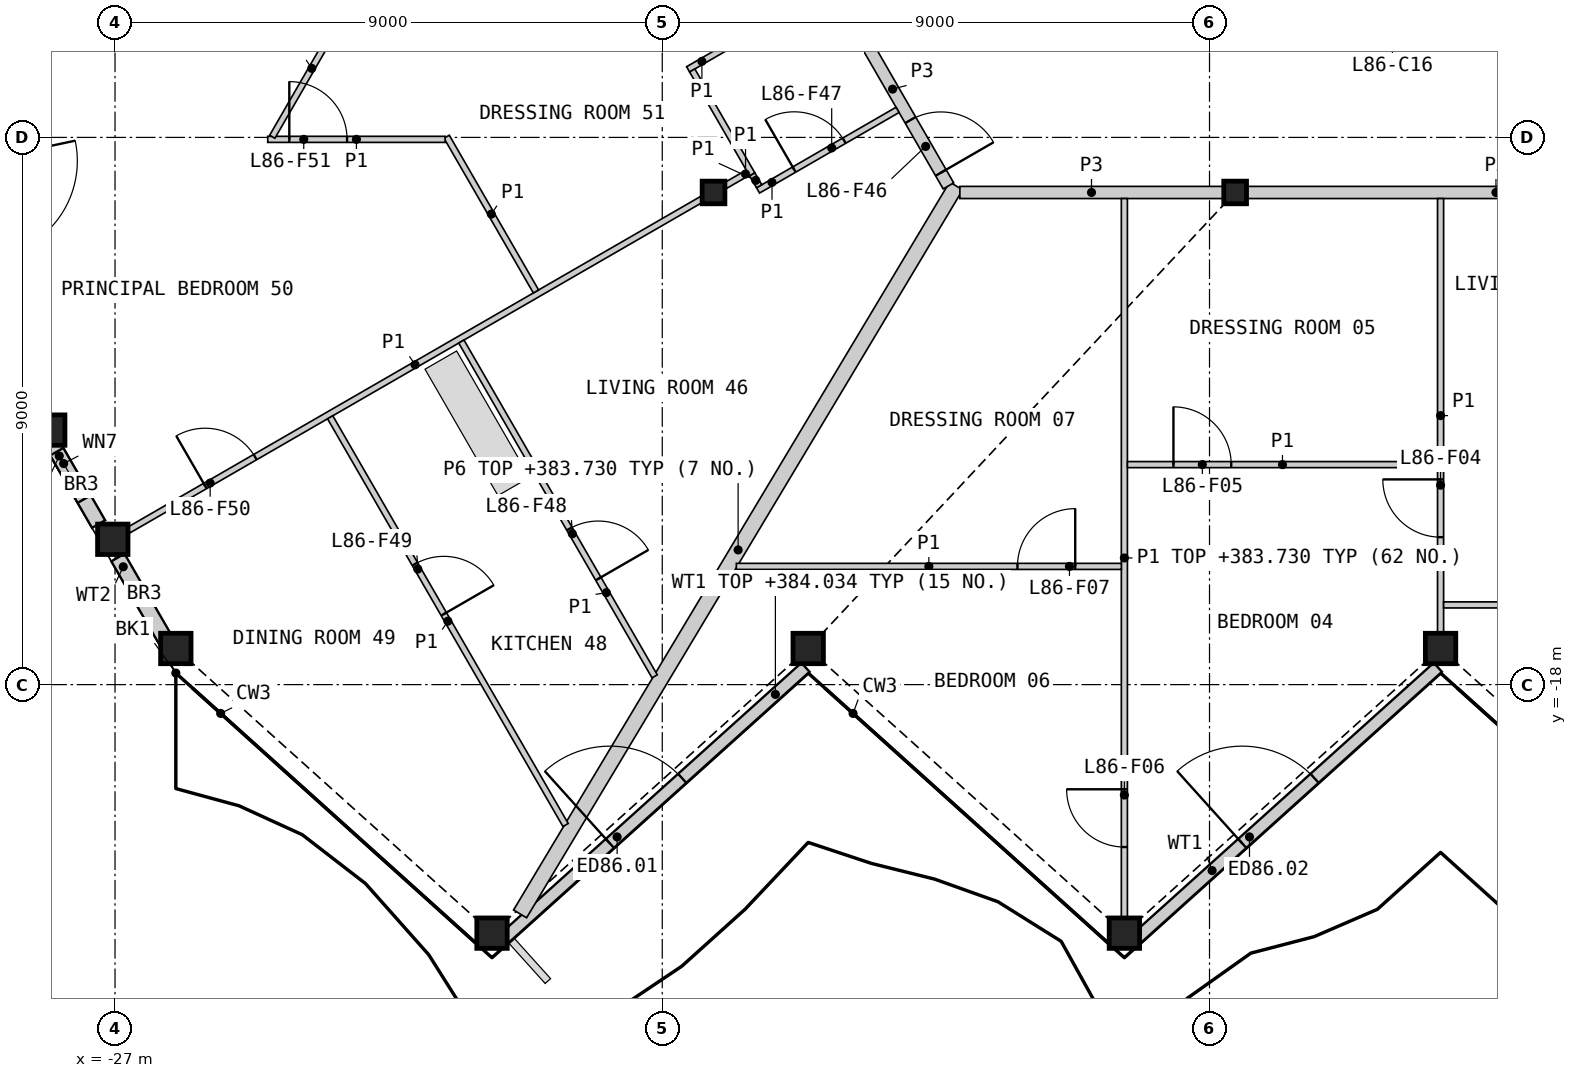
"""IFC4 building model, lengths in metres.
Left out: names, types, materials, properties, quantities, classifications, styles, units other than length and angle.
Written with IfcOpenShell. Run it as: python <this file> out.ifc"""

import sys

from ifc_helpers import new_model, si_unit, direction, frame, frame_2d, origin, origin_2d, place, context, subcontext, project, spatial, rectangle, hollow_rectangle, i_section, extrude, element, fill, save


model = new_model("IFC4")
c1 = context("Model", 3, precision=1e-05, world=origin(), true_north=direction((0.0, 1.0)))
c2 = subcontext(c1, "Body", "Model", "MODEL_VIEW")
j1 = project(units=[si_unit("LENGTHUNIT", "METRE"), si_unit("PLANEANGLEUNIT", "RADIAN")], contexts=[c1])
p1 = place(None, origin())
s1 = spatial("IfcSite", under=j1, at=p1, CompositionType="ELEMENT")
p2 = place(p1, origin())
s2 = spatial("IfcBuilding", under=s1, at=p2, CompositionType="ELEMENT")
p3 = place(p2, frame((0.0, 0.0, 381.4)))
s3 = spatial("IfcBuildingStorey", under=s2, at=p3, CompositionType="ELEMENT", Elevation=381.4)
for number, where, z_axis, x_axis in (
    (1, (-26.0, -17.406, 0.0), (0.0, 0.0, 1.0), (1.0, 0.0, 0.0)),
    (2, (-20.8, -22.088, 0.0), (0.0, 0.0, 1.0), (1.0, 0.0, 0.0)),
    (3, (-15.6, -17.406, 0.0), (0.0, 0.0, 1.0), (1.0, 0.0, 0.0)),
    (4, (-10.4, -22.088, 0.0), (0.0, 0.0, 1.0), (1.0, 0.0, 0.0)),
    (5, (-5.2, -17.406, 0.0), (0.0, 0.0, 1.0), (1.0, 0.0, 0.0)),
    (6, (-28.074, -13.814, 0.0), (0.0, 0.0, 1.0), (1.0, 0.0, 0.0)),
    (7, (-27.037, -15.61, 0.0), (0.0, 0.0, 1.0), (1.0, 0.0, 0.0)),
):
    element("IfcColumn", number, at=place(p3, frame(where, z_axis=z_axis, x_axis=x_axis)), inside=s3, PredefinedType="COLUMN", context=c2, shape_type="SweptSolid", body=[
        extrude(hollow_rectangle(XDim=0.5, YDim=0.5, WallThickness=0.03, at=origin_2d()), origin(), (0.0, 0.0, 1.0), 3.4),
    ])
for number, where, z_axis, x_axis in (
    (8, (-17.157, -9.906, 0.0), (0.0, 0.0, 1.0), (1.0, 0.0, 0.0)),
    (9, (-8.578, -9.906, 0.0), (0.0, 0.0, 1.0), (1.0, 0.0, 0.0)),
):
    element("IfcColumn", number, at=place(p3, frame(where, z_axis=z_axis, x_axis=x_axis)), inside=s3, PredefinedType="COLUMN", context=c2, shape_type="SweptSolid", body=[
        extrude(i_section(OverallWidth=0.374, OverallDepth=0.372, WebThickness=0.016, FlangeThickness=0.026, at=origin_2d()), origin(), (0.0, 0.0, 1.0), 3.4),
    ])
p4 = place(p3, frame((-20.595, -22.173, 0.0), z_axis=(0.0, 0.0, 1.0), x_axis=(0.743135582201, 0.669140871915, 0.0)))
e10 = element("IfcWall", 10, at=p4, inside=s3, PredefinedType="SOLIDWALL", context=c2, shape_type="SweptSolid", body=[
    extrude(rectangle(XDim=6.662, YDim=0.2, at=frame_2d((3.331, 0.0))), origin(), (0.0, 0.0, 1.0), 2.634),
])
p5 = place(p4, frame((2.333, 0.0, 0.0)))
e11 = element("IfcOpeningElement", 11, at=p5, cuts=e10, PredefinedType="OPENING", context=c2, shape_type="SweptSolid", body=[
    extrude(rectangle(XDim=1.6, YDim=2.25, at=frame_2d((0.8, 1.125))), frame((0.0, 0.11, 0.0), z_axis=(0.0, -1.0, 0.0), x_axis=(1.0, 0.0, 0.0)), (0.0, 0.0, 1.0), 0.22),
])
p6 = place(p3, frame((-10.195, -22.173, 0.0), z_axis=(0.0, 0.0, 1.0), x_axis=(0.743119171875, 0.669159096473, 0.0)))
e12 = element("IfcWall", 12, at=p6, inside=s3, PredefinedType="SOLIDWALL", context=c2, shape_type="SweptSolid", body=[
    extrude(rectangle(XDim=6.661, YDim=0.2, at=frame_2d((3.331, 0.0))), origin(), (0.0, 0.0, 1.0), 2.634),
])
p7 = place(p6, frame((2.333, 0.0, 0.0)))
e13 = element("IfcOpeningElement", 13, at=p7, cuts=e12, PredefinedType="OPENING", context=c2, shape_type="SweptSolid", body=[
    extrude(rectangle(XDim=1.6, YDim=2.25, at=frame_2d((0.8, 1.125))), frame((0.0, 0.11, 0.0), z_axis=(0.0, -1.0, 0.0), x_axis=(1.0, 0.0, 0.0)), (0.0, 0.0, 1.0), 0.22),
])
p8 = place(p3, frame((-28.132, -13.866, 0.0), z_axis=(0.0, 0.0, 1.0), x_axis=(0.499975693202, -0.866039436866, 0.0)))
e14 = element("IfcWall", 14, at=p8, inside=s3, PredefinedType="SOLIDWALL", context=c2, shape_type="SweptSolid", body=[
    extrude(rectangle(XDim=1.725, YDim=0.25, at=frame_2d((0.862, 0.0))), origin(), (0.0, 0.0, 1.0), 2.634),
])
p9 = place(p8, frame((0.35, 0.0, 1.8)))
e15 = element("IfcOpeningElement", 15, at=p9, cuts=e14, PredefinedType="OPENING", context=c2, shape_type="SweptSolid", body=[
    extrude(rectangle(XDim=0.9, YDim=0.6, at=frame_2d((0.45, 0.3))), frame((0.0, 0.135, 0.0), z_axis=(0.0, -1.0, 0.0), x_axis=(1.0, 0.0, 0.0)), (0.0, 0.0, 1.0), 0.27),
])
p10 = place(p3, frame((-26.953, -15.91, 0.0), z_axis=(0.0, 0.0, 1.0), x_axis=(0.500027377864, -0.86600959659, 0.0)))
e16 = element("IfcWall", 16, at=p10, inside=s3, PredefinedType="SOLIDWALL", context=c2, shape_type="SweptSolid", body=[
    extrude(rectangle(XDim=1.756, YDim=0.25, at=frame_2d((0.878, 0.0))), origin(), (0.0, 0.0, 1.0), 2.634),
])
p11 = place(p3, frame((-20.338, -21.771, 0.0), z_axis=(0.0, 0.0, 1.0), x_axis=(0.513878217441, 0.857863146218, 0.0)))
e17 = element("IfcWall", 17, at=p11, inside=s3, PredefinedType="PARTITIONING", context=c2, shape_type="SweptSolid", body=[
    extrude(rectangle(XDim=13.956, YDim=0.25, at=frame_2d((6.978, 0.0))), origin(), (0.0, 0.0, 1.0), 2.33),
])
p12 = place(p3, frame((-8.382, -9.906, 0.0), z_axis=(0.0, 0.0, 1.0), x_axis=(1.0, 0.0, 0.0)))
e18 = element("IfcWall", 18, at=p12, inside=s3, PredefinedType="PARTITIONING", context=c2, shape_type="SweptSolid", body=[
    extrude(rectangle(XDim=8.185, YDim=0.2, at=frame_2d((4.092, 0.0))), origin(), (0.0, 0.0, 1.0), 3.1),
])
p13 = place(p12, frame((5.213, 0.0, 0.0)))
e19 = element("IfcOpeningElement", 19, at=p13, cuts=e18, PredefinedType="OPENING", context=c2, shape_type="SweptSolid", body=[
    extrude(rectangle(XDim=1.0, YDim=2.1, at=frame_2d((0.5, 1.05))), frame((0.0, 0.11, 0.0), z_axis=(0.0, -1.0, 0.0), x_axis=(1.0, 0.0, 0.0)), (0.0, 0.0, 1.0), 0.22),
])
p14 = place(p3, frame((-13.106, -9.906, 0.0), z_axis=(0.0, 0.0, 1.0), x_axis=(1.0, 0.0, 0.0)))
e20 = element("IfcWall", 20, at=p14, inside=s3, PredefinedType="PARTITIONING", context=c2, shape_type="SweptSolid", body=[
    extrude(rectangle(XDim=4.331, YDim=0.2, at=frame_2d((2.165, 0.0))), origin(), (0.0, 0.0, 1.0), 3.1),
])
p15 = place(p3, frame((-15.131, -6.614, 0.0), z_axis=(0.0, 0.0, 1.0), x_axis=(0.499967746641, -0.866044024469, 0.0)))
e21 = element("IfcWall", 21, at=p15, inside=s3, PredefinedType="PARTITIONING", context=c2, shape_type="SweptSolid", body=[
    extrude(rectangle(XDim=3.676, YDim=0.2, at=frame_2d((1.838, 0.0))), origin(), (0.0, 0.0, 1.0), 3.1),
])
p16 = place(p15, frame((2.426, 0.0, 0.0)))
e22 = element("IfcOpeningElement", 22, at=p16, cuts=e21, PredefinedType="OPENING", context=c2, shape_type="SweptSolid", body=[
    extrude(rectangle(XDim=1.0, YDim=2.1, at=frame_2d((0.5, 1.05))), frame((0.0, 0.11, 0.0), z_axis=(0.0, -1.0, 0.0), x_axis=(1.0, 0.0, 0.0)), (0.0, 0.0, 1.0), 0.22),
])
p17 = place(p3, frame((-10.4, -21.828, 0.0), z_axis=(0.0, 0.0, 1.0), x_axis=(0.0, 1.0, 0.0)))
e23 = element("IfcWall", 23, at=p17, inside=s3, PredefinedType="PARTITIONING", context=c2, shape_type="SweptSolid", body=[
    extrude(rectangle(XDim=11.822, YDim=0.1, at=frame_2d((5.911, 0.0))), origin(), (0.0, 0.0, 1.0), 2.33),
])
p18 = place(p17, frame((1.156, 0.0, 0.0)))
e24 = element("IfcOpeningElement", 24, at=p18, cuts=e23, PredefinedType="OPENING", context=c2, shape_type="SweptSolid", body=[
    extrude(rectangle(XDim=0.95, YDim=2.1, at=frame_2d((0.475, 1.05))), frame((0.0, 0.06, 0.0), z_axis=(0.0, -1.0, 0.0), x_axis=(1.0, 0.0, 0.0)), (0.0, 0.0, 1.0), 0.12),
])
p19 = place(p3, frame((-26.777, -15.46, 0.0), z_axis=(0.0, 0.0, 1.0), x_axis=(0.866019680922, 0.500009912158, 0.0)))
e25 = element("IfcWall", 25, at=p19, inside=s3, PredefinedType="PARTITIONING", context=c2, shape_type="SweptSolid", body=[
    extrude(rectangle(XDim=10.881, YDim=0.1, at=frame_2d((5.44, 0.0))), origin(), (0.0, 0.0, 1.0), 2.33),
])
p20 = place(p19, frame((1.454, 0.0, 0.0)))
e26 = element("IfcOpeningElement", 26, at=p20, cuts=e25, PredefinedType="OPENING", context=c2, shape_type="SweptSolid", body=[
    extrude(rectangle(XDim=0.95, YDim=2.1, at=frame_2d((0.475, 1.05))), frame((0.0, 0.06, 0.0), z_axis=(0.0, -1.0, 0.0), x_axis=(1.0, 0.0, 0.0)), (0.0, 0.0, 1.0), 0.12),
])
p21 = place(p3, frame((-23.462, -13.603, 0.0), z_axis=(0.0, 0.0, 1.0), x_axis=(0.499998111909, -0.866026493871, 0.0)))
e27 = element("IfcWall", 27, at=p21, inside=s3, PredefinedType="PARTITIONING", context=c2, shape_type="SweptSolid", body=[
    extrude(rectangle(XDim=7.743, YDim=0.1, at=frame_2d((3.872, 0.0))), origin(), (0.0, 0.0, 1.0), 2.33),
])
p22 = place(p21, frame((2.788, 0.0, 0.0)))
e28 = element("IfcOpeningElement", 28, at=p22, cuts=e27, PredefinedType="OPENING", context=c2, shape_type="SweptSolid", body=[
    extrude(rectangle(XDim=0.95, YDim=2.1, at=frame_2d((0.475, 1.05))), frame((0.0, 0.06, 0.0), z_axis=(0.0, -1.0, 0.0), x_axis=(1.0, 0.0, 0.0)), (0.0, 0.0, 1.0), 0.12),
])
p23 = place(p3, frame((-5.2, -17.146, 0.0), z_axis=(0.0, 0.0, 1.0), x_axis=(0.0, 1.0, 0.0)))
e29 = element("IfcWall", 29, at=p23, inside=s3, PredefinedType="PARTITIONING", context=c2, shape_type="SweptSolid", body=[
    extrude(rectangle(XDim=7.14, YDim=0.1, at=frame_2d((3.57, 0.0))), origin(), (0.0, 0.0, 1.0), 2.33),
])
p24 = place(p23, frame((1.571, 0.0, 0.0)))
e30 = element("IfcOpeningElement", 30, at=p24, cuts=e29, PredefinedType="OPENING", context=c2, shape_type="SweptSolid", body=[
    extrude(rectangle(XDim=0.95, YDim=2.1, at=frame_2d((0.475, 1.05))), frame((0.0, 0.06, 0.0), z_axis=(0.0, -1.0, 0.0), x_axis=(1.0, 0.0, 0.0)), (0.0, 0.0, 1.0), 0.12),
])
p25 = place(p3, frame((-21.304, -12.358, 0.0), z_axis=(0.0, 0.0, 1.0), x_axis=(0.500000558108, -0.866025081561, 0.0)))
e31 = element("IfcWall", 31, at=p25, inside=s3, PredefinedType="PARTITIONING", context=c2, shape_type="SweptSolid", body=[
    extrude(rectangle(XDim=6.358, YDim=0.1, at=frame_2d((3.179, 0.0))), origin(), (0.0, 0.0, 1.0), 2.33),
])
p26 = place(p25, frame((3.555, 0.0, 0.0)))
e32 = element("IfcOpeningElement", 32, at=p26, cuts=e31, PredefinedType="OPENING", context=c2, shape_type="SweptSolid", body=[
    extrude(rectangle(XDim=0.95, YDim=2.1, at=frame_2d((0.475, 1.05))), frame((0.0, 0.06, 0.0), z_axis=(0.0, -1.0, 0.0), x_axis=(1.0, 0.0, 0.0)), (0.0, 0.0, 1.0), 0.12),
])
p27 = place(p3, frame((-16.781, -16.055, 0.0), z_axis=(0.0, 0.0, 1.0), x_axis=(1.0, 0.0, 0.0)))
e33 = element("IfcWall", 33, at=p27, inside=s3, PredefinedType="PARTITIONING", context=c2, shape_type="SweptSolid", body=[
    extrude(rectangle(XDim=6.332, YDim=0.1, at=frame_2d((3.166, 0.0))), origin(), (0.0, 0.0, 1.0), 2.33),
])
p28 = place(p27, frame((4.623, 0.0, 0.0)))
e34 = element("IfcOpeningElement", 34, at=p28, cuts=e33, PredefinedType="OPENING", context=c2, shape_type="SweptSolid", body=[
    extrude(rectangle(XDim=0.95, YDim=2.1, at=frame_2d((0.475, 1.05))), frame((0.0, 0.06, 0.0), z_axis=(0.0, -1.0, 0.0), x_axis=(1.0, 0.0, 0.0)), (0.0, 0.0, 1.0), 0.12),
])
p29 = place(p3, frame((-5.15, -16.689, 0.0), z_axis=(0.0, 0.0, 1.0), x_axis=(1.0, 0.0, 0.0)))
e35 = element("IfcWall", 35, at=p29, inside=s3, PredefinedType="PARTITIONING", context=c2, shape_type="SweptSolid", body=[
    extrude(rectangle(XDim=5.05, YDim=0.1, at=frame_2d((2.525, 0.0))), origin(), (0.0, 0.0, 1.0), 2.33),
])
p30 = place(p29, frame((1.25, 0.0, 0.0)))
e36 = element("IfcOpeningElement", 36, at=p30, cuts=e35, PredefinedType="OPENING", context=c2, shape_type="SweptSolid", body=[
    extrude(rectangle(XDim=0.95, YDim=2.1, at=frame_2d((0.475, 1.05))), frame((0.0, 0.06, 0.0), z_axis=(0.0, -1.0, 0.0), x_axis=(1.0, 0.0, 0.0)), (0.0, 0.0, 1.0), 0.12),
])
p31 = place(p3, frame((-10.35, -14.382, 0.0), z_axis=(0.0, 0.0, 1.0), x_axis=(1.0, 0.0, 0.0)))
e37 = element("IfcWall", 37, at=p31, inside=s3, PredefinedType="PARTITIONING", context=c2, shape_type="SweptSolid", body=[
    extrude(rectangle(XDim=5.1, YDim=0.1, at=frame_2d((2.55, 0.0))), origin(), (0.0, 0.0, 1.0), 2.33),
])
p32 = place(p31, frame((0.757, 0.0, 0.0)))
e38 = element("IfcOpeningElement", 38, at=p32, cuts=e37, PredefinedType="OPENING", context=c2, shape_type="SweptSolid", body=[
    extrude(rectangle(XDim=0.95, YDim=2.1, at=frame_2d((0.475, 1.05))), frame((0.0, 0.06, 0.0), z_axis=(0.0, -1.0, 0.0), x_axis=(1.0, 0.0, 0.0)), (0.0, 0.0, 1.0), 0.12),
])
p33 = place(p3, frame((-21.546, -8.989, 0.0), z_axis=(0.0, 0.0, 1.0), x_axis=(0.499919039967, -0.866072141036, 0.0)))
e39 = element("IfcWall", 39, at=p33, inside=s3, PredefinedType="PARTITIONING", context=c2, shape_type="SweptSolid", body=[
    extrude(rectangle(XDim=2.938, YDim=0.1, at=frame_2d((1.469, 0.0))), origin(), (0.0, 0.0, 1.0), 2.33),
])
p34 = place(p3, frame((-24.489, -9.032, 0.0), z_axis=(0.0, 0.0, 1.0), x_axis=(1.0, 0.0, 0.0)))
e40 = element("IfcWall", 40, at=p34, inside=s3, PredefinedType="PARTITIONING", context=c2, shape_type="SweptSolid", body=[
    extrude(rectangle(XDim=2.917, YDim=0.1, at=frame_2d((1.459, 0.0))), origin(), (0.0, 0.0, 1.0), 2.33),
])
p35 = place(p34, frame((0.355, 0.0, 0.0)))
e41 = element("IfcOpeningElement", 41, at=p35, cuts=e40, PredefinedType="OPENING", context=c2, shape_type="SweptSolid", body=[
    extrude(rectangle(XDim=0.95, YDim=2.1, at=frame_2d((0.475, 1.05))), frame((0.0, 0.06, 0.0), z_axis=(0.0, -1.0, 0.0), x_axis=(1.0, 0.0, 0.0)), (0.0, 0.0, 1.0), 0.12),
])
p36 = place(p3, frame((-24.414, -8.989, 0.0), z_axis=(0.0, 0.0, 1.0), x_axis=(0.500042595688, 0.866000809756, 0.0)))
e42 = element("IfcWall", 42, at=p36, inside=s3, PredefinedType="PARTITIONING", context=c2, shape_type="SweptSolid", body=[
    extrude(rectangle(XDim=2.596, YDim=0.1, at=frame_2d((1.298, 0.0))), origin(), (0.0, 0.0, 1.0), 2.33),
])
p37 = place(p3, frame((-17.575, -7.881, 0.0), z_axis=(0.0, 0.0, 1.0), x_axis=(0.866036909293, 0.499980071345, 0.0)))
e43 = element("IfcWall", 43, at=p37, inside=s3, PredefinedType="PARTITIONING", context=c2, shape_type="SweptSolid", body=[
    extrude(rectangle(XDim=2.625, YDim=0.1, at=frame_2d((1.312, 0.0))), origin(), (0.0, 0.0, 1.0), 2.33),
])
p38 = place(p3, frame((-16.425, -9.872, 0.0), z_axis=(0.0, 0.0, 1.0), x_axis=(0.86603978909, 0.499975083092, 0.0)))
e44 = element("IfcWall", 44, at=p38, inside=s3, PredefinedType="PARTITIONING", context=c2, shape_type="SweptSolid", body=[
    extrude(rectangle(XDim=2.649, YDim=0.1, at=frame_2d((1.325, 0.0))), origin(), (0.0, 0.0, 1.0), 2.33),
])
p39 = place(p38, frame((0.686, 0.0, 0.0)))
e45 = element("IfcOpeningElement", 45, at=p39, cuts=e44, PredefinedType="OPENING", context=c2, shape_type="SweptSolid", body=[
    extrude(rectangle(XDim=0.95, YDim=2.1, at=frame_2d((0.475, 1.05))), frame((0.0, 0.06, 0.0), z_axis=(0.0, -1.0, 0.0), x_axis=(1.0, 0.0, 0.0)), (0.0, 0.0, 1.0), 0.12),
])
p40 = place(p3, frame((-17.507, -7.899, 0.0), z_axis=(0.0, 0.0, 1.0), x_axis=(0.500011643316, -0.866018681408, 0.0)))
e46 = element("IfcWall", 46, at=p40, inside=s3, PredefinedType="PARTITIONING", context=c2, shape_type="SweptSolid", body=[
    extrude(rectangle(XDim=1.973, YDim=0.1, at=frame_2d((0.987, 0.0))), origin(), (0.0, 0.0, 1.0), 2.33),
])
p41 = place(p3, frame((-16.96, -9.792, 0.0), z_axis=(0.0, 0.0, 1.0), x_axis=(0.866137484628, 0.499805820016, 0.0)))
e47 = element("IfcWall", 47, at=p41, inside=s3, PredefinedType="PARTITIONING", context=c2, shape_type="SweptSolid", body=[
    extrude(rectangle(XDim=0.423, YDim=0.1, at=frame_2d((0.211, 0.0))), origin(), (0.0, 0.0, 1.0), 2.33),
])
p42 = place(p3, frame((-16.519, -9.61, 0.0), z_axis=(0.0, 0.0, 1.0), x_axis=(0.50245032488, -0.864606078528, 0.0)))
e48 = element("IfcWall", 48, at=p42, inside=s3, PredefinedType="PARTITIONING", context=c2, shape_type="SweptSolid", body=[
    extrude(rectangle(XDim=0.224, YDim=0.1, at=frame_2d((0.112, 0.0))), origin(), (0.0, 0.0, 1.0), 2.33),
])
p43 = place(p5, origin())
e49 = element("IfcDoor", 49, at=p43, inside=s3, OperationType="DOUBLE_DOOR_SINGLE_SWING", PredefinedType="DOOR", context=c2, shape_type="SweptSolid", body=[
    extrude(rectangle(XDim=1.6, YDim=2.25, at=frame_2d((0.8, 1.125))), frame((0.0, 0.025, 0.0), z_axis=(0.0, -1.0, 0.0), x_axis=(1.0, 0.0, 0.0)), (0.0, 0.0, 1.0), 0.05),
])
fill(e11, e49)
p44 = place(p7, origin())
e50 = element("IfcDoor", 50, at=p44, inside=s3, OperationType="DOUBLE_DOOR_SINGLE_SWING", PredefinedType="DOOR", context=c2, shape_type="SweptSolid", body=[
    extrude(rectangle(XDim=1.6, YDim=2.25, at=frame_2d((0.8, 1.125))), frame((0.0, 0.025, 0.0), z_axis=(0.0, -1.0, 0.0), x_axis=(1.0, 0.0, 0.0)), (0.0, 0.0, 1.0), 0.05),
])
fill(e13, e50)
p45 = place(p9, origin())
e51 = element("IfcWindow", 51, at=p45, inside=s3, PartitioningType="SINGLE_PANEL", PredefinedType="WINDOW", context=c2, shape_type="SweptSolid", body=[
    extrude(rectangle(XDim=0.9, YDim=0.6, at=frame_2d((0.45, 0.3))), frame((0.0, 0.03, 0.0), z_axis=(0.0, -1.0, 0.0), x_axis=(1.0, 0.0, 0.0)), (0.0, 0.0, 1.0), 0.06),
])
fill(e15, e51)
p46 = place(p24, origin())
e52 = element("IfcDoor", 52, at=p46, inside=s3, OperationType="SINGLE_SWING_RIGHT", PredefinedType="DOOR", context=c2, shape_type="SweptSolid", body=[
    extrude(rectangle(XDim=0.95, YDim=2.1, at=frame_2d((0.475, 1.05))), frame((0.0, 0.025, 0.0), z_axis=(0.0, -1.0, 0.0), x_axis=(1.0, 0.0, 0.0)), (0.0, 0.0, 1.0), 0.05),
])
fill(e30, e52)
p47 = place(p32, origin())
e53 = element("IfcDoor", 53, at=p47, inside=s3, OperationType="SINGLE_SWING_LEFT", PredefinedType="DOOR", context=c2, shape_type="SweptSolid", body=[
    extrude(rectangle(XDim=0.95, YDim=2.1, at=frame_2d((0.475, 1.05))), frame((0.0, 0.025, 0.0), z_axis=(0.0, -1.0, 0.0), x_axis=(1.0, 0.0, 0.0)), (0.0, 0.0, 1.0), 0.05),
])
fill(e38, e53)
p48 = place(p18, origin())
e54 = element("IfcDoor", 54, at=p48, inside=s3, OperationType="SINGLE_SWING_RIGHT", PredefinedType="DOOR", context=c2, shape_type="SweptSolid", body=[
    extrude(rectangle(XDim=0.95, YDim=2.1, at=frame_2d((0.475, 1.05))), frame((0.0, 0.025, 0.0), z_axis=(0.0, -1.0, 0.0), x_axis=(1.0, 0.0, 0.0)), (0.0, 0.0, 1.0), 0.05),
])
fill(e24, e54)
p49 = place(p28, origin())
e55 = element("IfcDoor", 55, at=p49, inside=s3, OperationType="SINGLE_SWING_RIGHT", PredefinedType="DOOR", context=c2, shape_type="SweptSolid", body=[
    extrude(rectangle(XDim=0.95, YDim=2.1, at=frame_2d((0.475, 1.05))), frame((0.0, 0.025, 0.0), z_axis=(0.0, -1.0, 0.0), x_axis=(1.0, 0.0, 0.0)), (0.0, 0.0, 1.0), 0.05),
])
fill(e34, e55)
p50 = place(p16, origin())
e56 = element("IfcDoor", 56, at=p50, inside=s3, OperationType="SINGLE_SWING_RIGHT", PredefinedType="DOOR", context=c2, shape_type="SweptSolid", body=[
    extrude(rectangle(XDim=1.0, YDim=2.1, at=frame_2d((0.5, 1.05))), frame((0.0, 0.025, 0.0), z_axis=(0.0, -1.0, 0.0), x_axis=(1.0, 0.0, 0.0)), (0.0, 0.0, 1.0), 0.05),
])
fill(e22, e56)
p51 = place(p39, origin())
e57 = element("IfcDoor", 57, at=p51, inside=s3, OperationType="SINGLE_SWING_LEFT", PredefinedType="DOOR", context=c2, shape_type="SweptSolid", body=[
    extrude(rectangle(XDim=0.95, YDim=2.1, at=frame_2d((0.475, 1.05))), frame((0.0, 0.025, 0.0), z_axis=(0.0, -1.0, 0.0), x_axis=(1.0, 0.0, 0.0)), (0.0, 0.0, 1.0), 0.05),
])
fill(e45, e57)
p52 = place(p26, origin())
e58 = element("IfcDoor", 58, at=p52, inside=s3, OperationType="SINGLE_SWING_RIGHT", PredefinedType="DOOR", context=c2, shape_type="SweptSolid", body=[
    extrude(rectangle(XDim=0.95, YDim=2.1, at=frame_2d((0.475, 1.05))), frame((0.0, 0.025, 0.0), z_axis=(0.0, -1.0, 0.0), x_axis=(1.0, 0.0, 0.0)), (0.0, 0.0, 1.0), 0.05),
])
fill(e32, e58)
p53 = place(p22, origin())
e59 = element("IfcDoor", 59, at=p53, inside=s3, OperationType="SINGLE_SWING_RIGHT", PredefinedType="DOOR", context=c2, shape_type="SweptSolid", body=[
    extrude(rectangle(XDim=0.95, YDim=2.1, at=frame_2d((0.475, 1.05))), frame((0.0, 0.025, 0.0), z_axis=(0.0, -1.0, 0.0), x_axis=(1.0, 0.0, 0.0)), (0.0, 0.0, 1.0), 0.05),
])
fill(e28, e59)
p54 = place(p20, origin())
e60 = element("IfcDoor", 60, at=p54, inside=s3, OperationType="SINGLE_SWING_LEFT", PredefinedType="DOOR", context=c2, shape_type="SweptSolid", body=[
    extrude(rectangle(XDim=0.95, YDim=2.1, at=frame_2d((0.475, 1.05))), frame((0.0, 0.025, 0.0), z_axis=(0.0, -1.0, 0.0), x_axis=(1.0, 0.0, 0.0)), (0.0, 0.0, 1.0), 0.05),
])
fill(e26, e60)
p55 = place(p35, origin())
e61 = element("IfcDoor", 61, at=p55, inside=s3, OperationType="SINGLE_SWING_LEFT", PredefinedType="DOOR", context=c2, shape_type="SweptSolid", body=[
    extrude(rectangle(XDim=0.95, YDim=2.1, at=frame_2d((0.475, 1.05))), frame((0.0, 0.025, 0.0), z_axis=(0.0, -1.0, 0.0), x_axis=(1.0, 0.0, 0.0)), (0.0, 0.0, 1.0), 0.05),
])
fill(e41, e61)
save(model, sys.argv[1])
